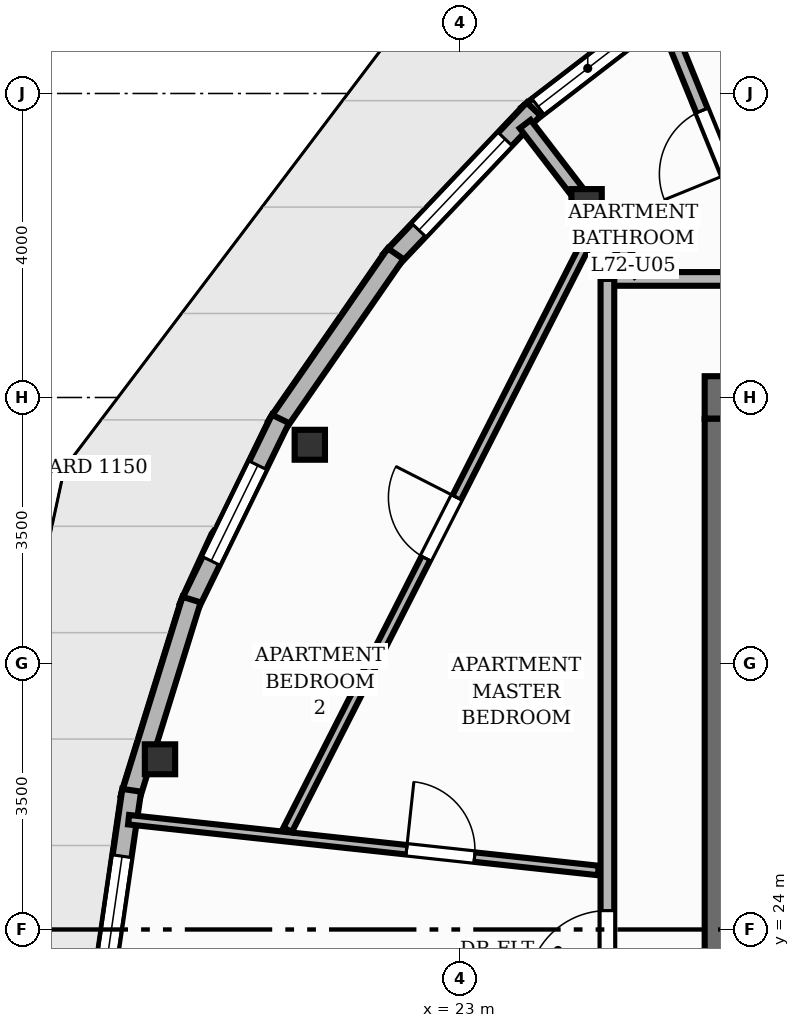
"""IFC4 building model, lengths in metres.
Left out: names, types, materials, properties, quantities, classifications, styles, units other than length and angle.
Written with IfcOpenShell. Run it as: python <this file> out.ifc"""

import sys

from ifc_helpers import new_model, si_unit, direction, frame, frame_2d, origin, origin_2d, place, context, subcontext, project, spatial, rectangle, i_section, extrude, element, fill, save


model = new_model("IFC4")
c1 = context("Model", 3, precision=1e-05, world=origin(), true_north=direction((0.0, 1.0)))
c2 = subcontext(c1, "Body", "Model", "MODEL_VIEW")
j1 = project(units=[si_unit("LENGTHUNIT", "METRE"), si_unit("PLANEANGLEUNIT", "RADIAN")], contexts=[c1])
p1 = place(None, origin())
s1 = spatial("IfcSite", under=j1, at=p1, CompositionType="ELEMENT")
p2 = place(p1, origin())
s2 = spatial("IfcBuilding", under=s1, at=p2, CompositionType="ELEMENT")
p3 = place(p2, frame((0.0, 0.0, 239.84)))
s3 = spatial("IfcBuildingStorey", under=s2, at=p3, CompositionType="ELEMENT", Elevation=239.84)
p4 = place(p3, frame((26.22, 31.0, 0.0), z_axis=(0.0, 0.0, 1.0), x_axis=(1.0, 0.0, 0.0)))
e1 = element("IfcWall", 1, at=p4, inside=s3, PredefinedType="SHEAR", context=c2, shape_type="SweptSolid", body=[
    extrude(rectangle(XDim=11.56, YDim=0.56, at=frame_2d((5.78, 0.0))), origin(), (0.0, 0.0, 1.0), 3.2),
])
p5 = place(p4, frame((8.18, 0.0, 0.0)))
e2 = element("IfcOpeningElement", 2, at=p5, cuts=e1, PredefinedType="OPENING", context=c2, shape_type="SweptSolid", body=[
    extrude(rectangle(XDim=1.1, YDim=2.15, at=frame_2d((0.55, 1.075))), frame((0.0, 0.29, 0.0), z_axis=(0.0, -1.0, 0.0), x_axis=(1.0, 0.0, 0.0)), (0.0, 0.0, 1.0), 0.58),
])
p6 = place(p4, frame((0.805, 0.0, 0.0)))
e3 = element("IfcOpeningElement", 3, at=p6, cuts=e1, PredefinedType="OPENING", context=c2, shape_type="SweptSolid", body=[
    extrude(rectangle(XDim=1.05, YDim=2.15, at=frame_2d((0.525, 1.075))), frame((0.0, 0.29, 0.0), z_axis=(0.0, -1.0, 0.0), x_axis=(1.0, 0.0, 0.0)), (0.0, 0.0, 1.0), 0.58),
])
p7 = place(p4, frame((2.555, 0.0, 0.0)))
e4 = element("IfcOpeningElement", 4, at=p7, cuts=e1, PredefinedType="OPENING", context=c2, shape_type="SweptSolid", body=[
    extrude(rectangle(XDim=1.05, YDim=2.15, at=frame_2d((0.525, 1.075))), frame((0.0, 0.29, 0.0), z_axis=(0.0, -1.0, 0.0), x_axis=(1.0, 0.0, 0.0)), (0.0, 0.0, 1.0), 0.58),
])
p8 = place(p4, frame((4.305, 0.0, 0.0)))
e5 = element("IfcOpeningElement", 5, at=p8, cuts=e1, PredefinedType="OPENING", context=c2, shape_type="SweptSolid", body=[
    extrude(rectangle(XDim=1.05, YDim=2.15, at=frame_2d((0.525, 1.075))), frame((0.0, 0.29, 0.0), z_axis=(0.0, -1.0, 0.0), x_axis=(1.0, 0.0, 0.0)), (0.0, 0.0, 1.0), 0.58),
])
p9 = place(p3, frame((26.5, 17.28, 0.0), z_axis=(0.0, 0.0, 1.0), x_axis=(0.0, 1.0, 0.0)))
e6 = element("IfcWall", 6, at=p9, inside=s3, PredefinedType="SHEAR", context=c2, shape_type="SweptSolid", body=[
    extrude(rectangle(XDim=13.44, YDim=0.56, at=frame_2d((6.72, 0.0))), origin(), (0.0, 0.0, 1.0), 3.2),
])
for number, where, z_axis, x_axis in (
    (7, (24.667, 33.545, 0.0), (0.0, 0.0, 1.0), (1.0, 0.0, 0.0)),
    (8, (21.025, 30.378, 0.0), (0.0, 0.0, 1.0), (1.0, 0.0, 0.0)),
    (9, (19.054, 26.24, 0.0), (0.0, 0.0, 1.0), (1.0, 0.0, 0.0)),
):
    element("IfcColumn", number, at=place(p3, frame(where, z_axis=z_axis, x_axis=x_axis)), inside=s3, PredefinedType="COLUMN", context=c2, shape_type="SweptSolid", body=[
        extrude(i_section(OverallWidth=0.399, OverallDepth=0.394, WebThickness=0.023, FlangeThickness=0.037, at=origin_2d()), origin(), (0.0, 0.0, 1.0), 3.2),
    ])
p10 = place(p3, frame((23.889, 34.721, 0.0), z_axis=(0.0, 0.0, 1.0), x_axis=(0.792543354822, 0.609815571076, 0.0)))
e10 = element("IfcWall", 10, at=p10, inside=s3, PredefinedType="SOLIDWALL", context=c2, shape_type="SweptSolid", body=[
    extrude(rectangle(XDim=2.702, YDim=0.25, at=frame_2d((1.351, 0.0))), origin(), (0.0, 0.0, 1.0), 2.88),
])
p11 = place(p10, frame((0.175, 0.0, 0.85)))
e11 = element("IfcOpeningElement", 11, at=p11, cuts=e10, PredefinedType="OPENING", context=c2, shape_type="SweptSolid", body=[
    extrude(rectangle(XDim=1.65, YDim=1.44, at=frame_2d((0.825, 0.72))), frame((0.0, 0.135, 0.0), z_axis=(0.0, -1.0, 0.0), x_axis=(1.0, 0.0, 0.0)), (0.0, 0.0, 1.0), 0.27),
])
p12 = place(p3, frame((22.085, 32.807, 0.0), z_axis=(0.0, 0.0, 1.0), x_axis=(0.688046261031, 0.725666826223, 0.0)))
e12 = element("IfcWall", 12, at=p12, inside=s3, PredefinedType="SOLIDWALL", context=c2, shape_type="SweptSolid", body=[
    extrude(rectangle(XDim=2.739, YDim=0.25, at=frame_2d((1.369, 0.0))), origin(), (0.0, 0.0, 1.0), 2.88),
])
p13 = place(p12, frame((0.544, 0.0, 0.85)))
e13 = element("IfcOpeningElement", 13, at=p13, cuts=e12, PredefinedType="OPENING", context=c2, shape_type="SweptSolid", body=[
    extrude(rectangle(XDim=1.65, YDim=1.55, at=frame_2d((0.825, 0.775))), frame((0.0, 0.135, 0.0), z_axis=(0.0, -1.0, 0.0), x_axis=(1.0, 0.0, 0.0)), (0.0, 0.0, 1.0), 0.27),
])
p14 = place(p3, frame((20.584, 30.624, 0.0), z_axis=(0.0, 0.0, 1.0), x_axis=(0.569421689582, 0.822045582333, 0.0)))
e14 = element("IfcWall", 14, at=p14, inside=s3, PredefinedType="SOLIDWALL", context=c2, shape_type="SweptSolid", body=[
    extrude(rectangle(XDim=2.758, YDim=0.25, at=frame_2d((1.379, 0.0))), origin(), (0.0, 0.0, 1.0), 2.88),
])
p15 = place(p3, frame((19.429, 28.239, 0.0), z_axis=(0.0, 0.0, 1.0), x_axis=(0.438517804861, 0.898722501565, 0.0)))
e15 = element("IfcWall", 15, at=p15, inside=s3, PredefinedType="SOLIDWALL", context=c2, shape_type="SweptSolid", body=[
    extrude(rectangle(XDim=2.758, YDim=0.25, at=frame_2d((1.379, 0.0))), origin(), (0.0, 0.0, 1.0), 2.88),
])
p16 = place(p15, frame((0.679, 0.0, 0.85)))
e16 = element("IfcOpeningElement", 16, at=p16, cuts=e15, PredefinedType="OPENING", context=c2, shape_type="SweptSolid", body=[
    extrude(rectangle(XDim=1.4, YDim=1.55, at=frame_2d((0.7, 0.775))), frame((0.0, 0.135, 0.0), z_axis=(0.0, -1.0, 0.0), x_axis=(1.0, 0.0, 0.0)), (0.0, 0.0, 1.0), 0.27),
])
p17 = place(p3, frame((18.657, 25.725, 0.0), z_axis=(0.0, 0.0, 1.0), x_axis=(0.29642164717, 0.955057174775, 0.0)))
e17 = element("IfcWall", 17, at=p17, inside=s3, PredefinedType="SOLIDWALL", context=c2, shape_type="SweptSolid", body=[
    extrude(rectangle(XDim=2.739, YDim=0.25, at=frame_2d((1.369, 0.0))), origin(), (0.0, 0.0, 1.0), 2.497),
])
p18 = place(p3, frame((18.292, 23.158, 0.0), z_axis=(0.0, 0.0, 1.0), x_axis=(0.144229466115, 0.989544269401, 0.0)))
e18 = element("IfcWall", 18, at=p18, inside=s3, PredefinedType="SOLIDWALL", context=c2, shape_type="SweptSolid", body=[
    extrude(rectangle(XDim=2.702, YDim=0.25, at=frame_2d((1.351, 0.0))), origin(), (0.0, 0.0, 1.0), 2.497),
])
p19 = place(p18, frame((0.175, 0.0, 0.85)))
e19 = element("IfcOpeningElement", 19, at=p19, cuts=e18, PredefinedType="OPENING", context=c2, shape_type="SweptSolid", body=[
    extrude(rectangle(XDim=1.65, YDim=1.55, at=frame_2d((0.825, 0.775))), frame((0.0, 0.135, 0.0), z_axis=(0.0, -1.0, 0.0), x_axis=(1.0, 0.0, 0.0)), (0.0, 0.0, 1.0), 0.27),
])
p20 = place(p3, frame((24.533, 33.719, 0.0), z_axis=(0.0, 0.0, 1.0), x_axis=(-0.609209464238, 0.793009349682, 0.0)))
e20 = element("IfcWall", 20, at=p20, inside=s3, PredefinedType="PARTITIONING", context=c2, shape_type="SweptSolid", body=[
    extrude(rectangle(XDim=1.106, YDim=0.18, at=frame_2d((0.553, 0.0))), origin(), (0.0, 0.0, 1.0), 2.323),
])
p21 = place(p3, frame((24.94, 32.56, 0.0), z_axis=(0.0, 0.0, 1.0), x_axis=(1.0, 0.0, 0.0)))
e21 = element("IfcWall", 21, at=p21, inside=s3, PredefinedType="PARTITIONING", context=c2, shape_type="SweptSolid", body=[
    extrude(rectangle(XDim=5.672, YDim=0.18, at=frame_2d((2.836, 0.0))), origin(), (0.0, 0.0, 1.0), 2.875),
])
p22 = place(p21, frame((3.373, 0.0, 0.0)))
e22 = element("IfcOpeningElement", 22, at=p22, cuts=e21, PredefinedType="OPENING", context=c2, shape_type="SweptSolid", body=[
    extrude(rectangle(XDim=1.05, YDim=2.15, at=frame_2d((0.525, 1.075))), frame((0.0, 0.1, 0.0), z_axis=(0.0, -1.0, 0.0), x_axis=(1.0, 0.0, 0.0)), (0.0, 0.0, 1.0), 0.2),
])
p23 = place(p3, frame((24.94, 22.664, 0.0), z_axis=(0.0, 0.0, 1.0), x_axis=(0.0, 1.0, 0.0)))
e23 = element("IfcWall", 23, at=p23, inside=s3, PredefinedType="PARTITIONING", context=c2, shape_type="SweptSolid", body=[
    extrude(rectangle(XDim=9.896, YDim=0.18, at=frame_2d((4.948, 0.0))), origin(), (0.0, 0.0, 1.0), 2.875),
])
p24 = place(p23, frame((0.535, 0.0, 0.0)))
e24 = element("IfcOpeningElement", 24, at=p24, cuts=e23, PredefinedType="OPENING", context=c2, shape_type="SweptSolid", body=[
    extrude(rectangle(XDim=1.05, YDim=2.15, at=frame_2d((0.525, 1.075))), frame((0.0, 0.1, 0.0), z_axis=(0.0, -1.0, 0.0), x_axis=(1.0, 0.0, 0.0)), (0.0, 0.0, 1.0), 0.2),
])
p25 = place(p3, frame((27.049, 32.653, 0.0), z_axis=(0.0, 0.0, 1.0), x_axis=(-0.377313729351, 0.92608549802, 0.0)))
e25 = element("IfcWall", 25, at=p25, inside=s3, PredefinedType="PLUMBINGWALL", context=c2, shape_type="SweptSolid", body=[
    extrude(rectangle(XDim=3.684, YDim=0.16, at=frame_2d((1.842, 0.0))), origin(), (0.0, 0.0, 1.0), 2.875),
])
p26 = place(p25, frame((1.392, 0.0, 0.0)))
e26 = element("IfcOpeningElement", 26, at=p26, cuts=e25, PredefinedType="OPENING", context=c2, shape_type="SweptSolid", body=[
    extrude(rectangle(XDim=0.9, YDim=2.1, at=frame_2d((0.45, 1.05))), frame((0.0, 0.09, 0.0), z_axis=(0.0, -1.0, 0.0), x_axis=(1.0, 0.0, 0.0)), (0.0, 0.0, 1.0), 0.18),
])
p27 = place(p3, frame((25.363, 32.639, 0.0), z_axis=(0.0, 0.0, 1.0), x_axis=(-0.609243305896, 0.792983350532, 0.0)))
e27 = element("IfcWall", 27, at=p27, inside=s3, PredefinedType="PLUMBINGWALL", context=c2, shape_type="SweptSolid", body=[
    extrude(rectangle(XDim=0.909, YDim=0.16, at=frame_2d((0.455, 0.0))), origin(), (0.0, 0.0, 1.0), 2.323),
])
p28 = place(p3, frame((18.64, 25.445, 0.0), z_axis=(0.0, 0.0, 1.0), x_axis=(0.994206026696, -0.107491285604, 0.0)))
e28 = element("IfcWall", 28, at=p28, inside=s3, PredefinedType="PARTITIONING", context=c2, shape_type="SweptSolid", body=[
    extrude(rectangle(XDim=6.217, YDim=0.125, at=frame_2d((3.108, 0.0))), origin(), (0.0, 0.0, 1.0), 2.875),
])
p29 = place(p28, frame((3.678, 0.0, 0.0)))
e29 = element("IfcOpeningElement", 29, at=p29, cuts=e28, PredefinedType="OPENING", context=c2, shape_type="SweptSolid", body=[
    extrude(rectangle(XDim=0.9, YDim=2.1, at=frame_2d((0.45, 1.05))), frame((0.0, 0.073, 0.0), z_axis=(0.0, -1.0, 0.0), x_axis=(1.0, 0.0, 0.0)), (0.0, 0.0, 1.0), 0.145),
])
p30 = place(p3, frame((20.734, 25.312, 0.0), z_axis=(0.0, 0.0, 1.0), x_axis=(0.45353588766, 0.891238014564, 0.0)))
e30 = element("IfcWall", 30, at=p30, inside=s3, PredefinedType="PARTITIONING", context=c2, shape_type="SweptSolid", body=[
    extrude(rectangle(XDim=8.912, YDim=0.125, at=frame_2d((4.456, 0.0))), origin(), (0.0, 0.0, 1.0), 2.875),
])
p31 = place(p30, frame((4.006, 0.0, 0.0)))
e31 = element("IfcOpeningElement", 31, at=p31, cuts=e30, PredefinedType="OPENING", context=c2, shape_type="SweptSolid", body=[
    extrude(rectangle(XDim=0.9, YDim=2.1, at=frame_2d((0.45, 1.05))), frame((0.0, 0.073, 0.0), z_axis=(0.0, -1.0, 0.0), x_axis=(1.0, 0.0, 0.0)), (0.0, 0.0, 1.0), 0.145),
])
p32 = place(p11, origin())
e32 = element("IfcWindow", 32, at=p32, inside=s3, PartitioningType="SINGLE_PANEL", PredefinedType="WINDOW", context=c2, shape_type="SweptSolid", body=[
    extrude(rectangle(XDim=1.65, YDim=1.44, at=frame_2d((0.825, 0.72))), frame((0.0, 0.03, 0.0), z_axis=(0.0, -1.0, 0.0), x_axis=(1.0, 0.0, 0.0)), (0.0, 0.0, 1.0), 0.06),
])
fill(e11, e32)
p33 = place(p13, origin())
e33 = element("IfcWindow", 33, at=p33, inside=s3, PartitioningType="SINGLE_PANEL", PredefinedType="WINDOW", context=c2, shape_type="SweptSolid", body=[
    extrude(rectangle(XDim=1.65, YDim=1.55, at=frame_2d((0.825, 0.775))), frame((0.0, 0.03, 0.0), z_axis=(0.0, -1.0, 0.0), x_axis=(1.0, 0.0, 0.0)), (0.0, 0.0, 1.0), 0.06),
])
fill(e13, e33)
p34 = place(p16, origin())
e34 = element("IfcWindow", 34, at=p34, inside=s3, PartitioningType="SINGLE_PANEL", PredefinedType="WINDOW", context=c2, shape_type="SweptSolid", body=[
    extrude(rectangle(XDim=1.4, YDim=1.55, at=frame_2d((0.7, 0.775))), frame((0.0, 0.03, 0.0), z_axis=(0.0, -1.0, 0.0), x_axis=(1.0, 0.0, 0.0)), (0.0, 0.0, 1.0), 0.06),
])
fill(e16, e34)
p35 = place(p19, origin())
e35 = element("IfcWindow", 35, at=p35, inside=s3, PartitioningType="SINGLE_PANEL", PredefinedType="WINDOW", context=c2, shape_type="SweptSolid", body=[
    extrude(rectangle(XDim=1.65, YDim=1.55, at=frame_2d((0.825, 0.775))), frame((0.0, 0.03, 0.0), z_axis=(0.0, -1.0, 0.0), x_axis=(1.0, 0.0, 0.0)), (0.0, 0.0, 1.0), 0.06),
])
fill(e19, e35)
p36 = place(p26, origin())
e36 = element("IfcDoor", 36, at=p36, inside=s3, OperationType="SINGLE_SWING_LEFT", PredefinedType="DOOR", context=c2, shape_type="SweptSolid", body=[
    extrude(rectangle(XDim=0.9, YDim=2.1, at=frame_2d((0.45, 1.05))), frame((0.0, 0.025, 0.0), z_axis=(0.0, -1.0, 0.0), x_axis=(1.0, 0.0, 0.0)), (0.0, 0.0, 1.0), 0.05),
])
fill(e26, e36)
p37 = place(p24, origin())
e37 = element("IfcDoor", 37, at=p37, inside=s3, OperationType="SINGLE_SWING_LEFT", PredefinedType="DOOR", context=c2, shape_type="SweptSolid", body=[
    extrude(rectangle(XDim=1.05, YDim=2.15, at=frame_2d((0.525, 1.075))), frame((0.0, 0.025, 0.0), z_axis=(0.0, -1.0, 0.0), x_axis=(1.0, 0.0, 0.0)), (0.0, 0.0, 1.0), 0.05),
])
fill(e24, e37)
p38 = place(p29, origin())
e38 = element("IfcDoor", 38, at=p38, inside=s3, OperationType="SINGLE_SWING_LEFT", PredefinedType="DOOR", context=c2, shape_type="SweptSolid", body=[
    extrude(rectangle(XDim=0.9, YDim=2.1, at=frame_2d((0.45, 1.05))), frame((0.0, 0.025, 0.0), z_axis=(0.0, -1.0, 0.0), x_axis=(1.0, 0.0, 0.0)), (0.0, 0.0, 1.0), 0.05),
])
fill(e29, e38)
p39 = place(p31, origin())
e39 = element("IfcDoor", 39, at=p39, inside=s3, OperationType="SINGLE_SWING_RIGHT", PredefinedType="DOOR", context=c2, shape_type="SweptSolid", body=[
    extrude(rectangle(XDim=0.9, YDim=2.1, at=frame_2d((0.45, 1.05))), frame((0.0, 0.025, 0.0), z_axis=(0.0, -1.0, 0.0), x_axis=(1.0, 0.0, 0.0)), (0.0, 0.0, 1.0), 0.05),
])
fill(e31, e39)
save(model, sys.argv[1])
